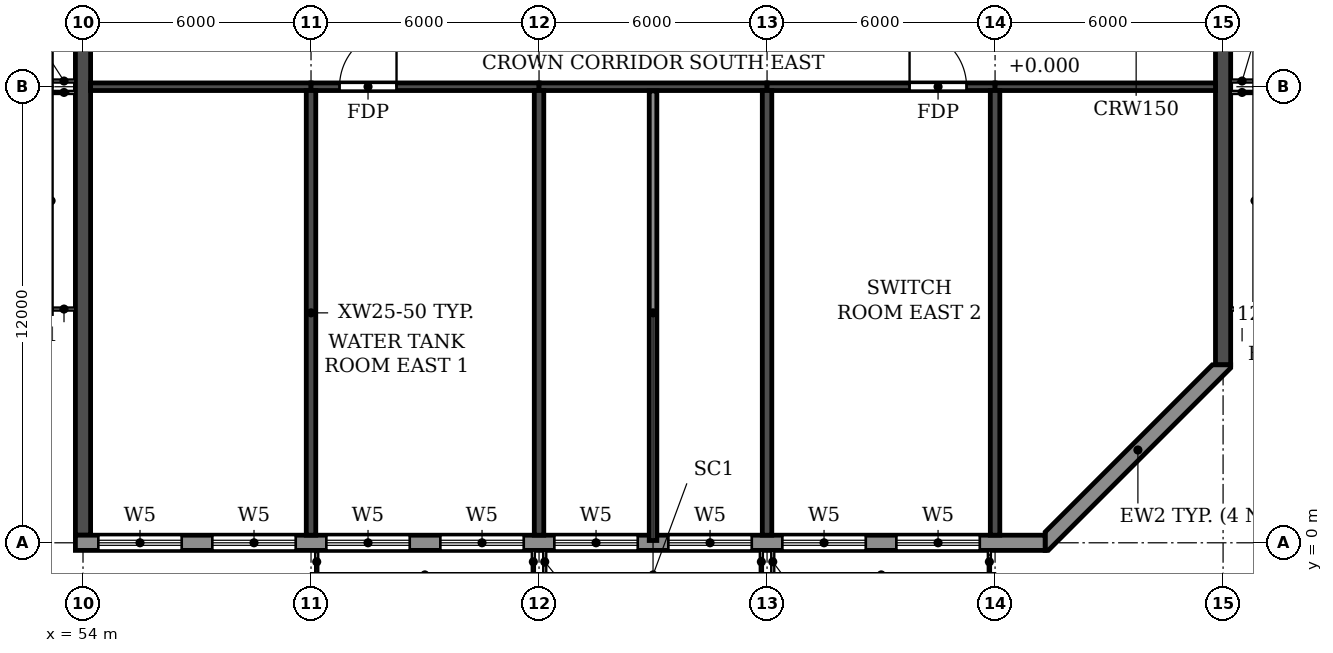
"""IFC4 building model, lengths in metres.
Left out: names, types, materials, properties, quantities, classifications, styles, units other than length and angle.
Written with IfcOpenShell. Run it as: python <this file> out.ifc"""

import sys

from ifc_helpers import new_model, si_unit, direction, frame, frame_2d, origin, place, context, subcontext, project, spatial, polyline, rectangle, outline, extrude, element, fill, save


model = new_model("IFC4")
c1 = context("Model", 3, precision=1e-05, world=origin(), true_north=direction((0.0, 1.0)))
c2 = subcontext(c1, "Body", "Model", "MODEL_VIEW")
j1 = project(units=[si_unit("LENGTHUNIT", "METRE"), si_unit("PLANEANGLEUNIT", "RADIAN")], contexts=[c1])
p1 = place(None, origin())
s1 = spatial("IfcSite", under=j1, at=p1, CompositionType="ELEMENT")
p2 = place(p1, origin())
s2 = spatial("IfcBuilding", under=s1, at=p2, CompositionType="ELEMENT")
p3 = place(p2, frame((0.0, 0.0, 279.0)))
s3 = spatial("IfcBuildingStorey", under=s2, at=p3, CompositionType="ELEMENT", Elevation=279.0)
for number, where, z_axis, x_axis in (
    (1, (60.0, 0.2, 0.0), (0.0, 0.0, 1.0), (0.0, 1.0, 0.0)),
    (2, (66.0, 0.2, 0.0), (0.0, 0.0, 1.0), (0.0, 1.0, 0.0)),
    (3, (72.0, 0.2, 0.0), (0.0, 0.0, 1.0), (0.0, 1.0, 0.0)),
    (4, (78.0, 0.2, 0.0), (0.0, 0.0, 1.0), (0.0, 1.0, 0.0)),
):
    element("IfcWall", number, at=place(p3, frame(where, z_axis=z_axis, x_axis=x_axis)), inside=s3, PredefinedType="SHEAR", context=c2, shape_type="SweptSolid", body=[
        extrude(rectangle(XDim=11.7, YDim=0.25, at=frame_2d((5.85, 0.0))), origin(), (0.0, 0.0, 1.0), 3.05),
    ])
p4 = place(p3, frame((54.0, 0.2, 0.0), z_axis=(0.0, 0.0, 1.0), x_axis=(0.0, 1.0, 0.0)))
e5 = element("IfcWall", 5, at=p4, inside=s3, PredefinedType="SHEAR", context=c2, shape_type="SweptSolid", body=[
    extrude(rectangle(XDim=40.8, YDim=0.4, at=frame_2d((20.4, 0.0))), origin(), (0.0, 0.0, 1.0), 3.05),
])
p5 = place(p3, frame((84.0, 4.683, 0.0), z_axis=(0.0, 0.0, 1.0), x_axis=(0.0, 1.0, 0.0)))
e6 = element("IfcWall", 6, at=p5, inside=s3, PredefinedType="SHEAR", context=c2, shape_type="SweptSolid", body=[
    extrude(rectangle(XDim=31.834, YDim=0.4, at=frame_2d((15.917, 0.0))), origin(), (0.0, 0.0, 1.0), 3.05),
])
p6 = place(p3, frame((54.2, 12.0, 0.0), z_axis=(0.0, 0.0, 1.0), x_axis=(1.0, 0.0, 0.0)))
e7 = element("IfcWall", 7, at=p6, inside=s3, PredefinedType="SHEAR", context=c2, shape_type="SweptSolid", body=[
    extrude(rectangle(XDim=5.8, YDim=0.2, at=frame_2d((2.9, 0.0))), origin(), (0.0, 0.0, 1.0), 2.45),
])
p7 = place(p3, frame((60.0, 12.0, 0.0), z_axis=(0.0, 0.0, 1.0), x_axis=(1.0, 0.0, 0.0)))
e8 = element("IfcWall", 8, at=p7, inside=s3, PredefinedType="SHEAR", context=c2, shape_type="SweptSolid", body=[
    extrude(rectangle(XDim=6.0, YDim=0.2, at=frame_2d((3.0, 0.0))), origin(), (0.0, 0.0, 1.0), 2.45),
])
p8 = place(p7, frame((0.75, 0.0, 0.0)))
e9 = element("IfcOpeningElement", 9, at=p8, cuts=e8, PredefinedType="OPENING", context=c2, shape_type="SweptSolid", body=[
    extrude(rectangle(XDim=1.5, YDim=2.1, at=frame_2d((0.75, 1.05))), frame((0.0, 0.11, 0.0), z_axis=(0.0, -1.0, 0.0), x_axis=(1.0, 0.0, 0.0)), (0.0, 0.0, 1.0), 0.22),
])
p9 = place(p3, frame((66.0, 12.0, 0.0), z_axis=(0.0, 0.0, 1.0), x_axis=(1.0, 0.0, 0.0)))
e10 = element("IfcWall", 10, at=p9, inside=s3, PredefinedType="SHEAR", context=c2, shape_type="SweptSolid", body=[
    extrude(rectangle(XDim=6.0, YDim=0.2, at=frame_2d((3.0, 0.0))), origin(), (0.0, 0.0, 1.0), 2.45),
])
p10 = place(p3, frame((72.0, 12.0, 0.0), z_axis=(0.0, 0.0, 1.0), x_axis=(1.0, 0.0, 0.0)))
e11 = element("IfcWall", 11, at=p10, inside=s3, PredefinedType="SHEAR", context=c2, shape_type="SweptSolid", body=[
    extrude(rectangle(XDim=6.0, YDim=0.2, at=frame_2d((3.0, 0.0))), origin(), (0.0, 0.0, 1.0), 2.45),
])
p11 = place(p10, frame((3.75, 0.0, 0.0)))
e12 = element("IfcOpeningElement", 12, at=p11, cuts=e11, PredefinedType="OPENING", context=c2, shape_type="SweptSolid", body=[
    extrude(rectangle(XDim=1.5, YDim=2.1, at=frame_2d((0.75, 1.05))), frame((0.0, 0.11, 0.0), z_axis=(0.0, -1.0, 0.0), x_axis=(1.0, 0.0, 0.0)), (0.0, 0.0, 1.0), 0.22),
])
p12 = place(p3, frame((78.0, 12.0, 0.0), z_axis=(0.0, 0.0, 1.0), x_axis=(1.0, 0.0, 0.0)))
e13 = element("IfcWall", 13, at=p12, inside=s3, PredefinedType="SHEAR", context=c2, shape_type="SweptSolid", body=[
    extrude(rectangle(XDim=5.8, YDim=0.2, at=frame_2d((2.9, 0.0))), origin(), (0.0, 0.0, 1.0), 2.45),
])
p13 = place(p3, frame((53.8, 0.0, 0.0), z_axis=(0.0, 0.0, 1.0), x_axis=(1.0, 0.0, 0.0)))
e14 = element("IfcWall", 14, at=p13, inside=s3, PredefinedType="STANDARD", context=c2, shape_type="SweptSolid", body=[
    extrude(rectangle(XDim=25.517, YDim=0.4, at=frame_2d((12.759, 0.0))), origin(), (0.0, 0.0, 1.0), 3.05),
])
p14 = place(p13, frame((0.6, 0.0, 0.6)))
e15 = element("IfcOpeningElement", 15, at=p14, cuts=e14, PredefinedType="OPENING", context=c2, shape_type="SweptSolid", body=[
    extrude(rectangle(XDim=2.2, YDim=2.4, at=frame_2d((1.1, 1.2))), frame((0.0, 0.21, 0.0), z_axis=(0.0, -1.0, 0.0), x_axis=(1.0, 0.0, 0.0)), (0.0, 0.0, 1.0), 0.42),
])
p15 = place(p13, frame((3.6, 0.0, 0.6)))
e16 = element("IfcOpeningElement", 16, at=p15, cuts=e14, PredefinedType="OPENING", context=c2, shape_type="SweptSolid", body=[
    extrude(rectangle(XDim=2.2, YDim=2.4, at=frame_2d((1.1, 1.2))), frame((0.0, 0.21, 0.0), z_axis=(0.0, -1.0, 0.0), x_axis=(1.0, 0.0, 0.0)), (0.0, 0.0, 1.0), 0.42),
])
p16 = place(p13, frame((6.6, 0.0, 0.6)))
e17 = element("IfcOpeningElement", 17, at=p16, cuts=e14, PredefinedType="OPENING", context=c2, shape_type="SweptSolid", body=[
    extrude(rectangle(XDim=2.2, YDim=2.4, at=frame_2d((1.1, 1.2))), frame((0.0, 0.21, 0.0), z_axis=(0.0, -1.0, 0.0), x_axis=(1.0, 0.0, 0.0)), (0.0, 0.0, 1.0), 0.42),
])
p17 = place(p13, frame((9.6, 0.0, 0.6)))
e18 = element("IfcOpeningElement", 18, at=p17, cuts=e14, PredefinedType="OPENING", context=c2, shape_type="SweptSolid", body=[
    extrude(rectangle(XDim=2.2, YDim=2.4, at=frame_2d((1.1, 1.2))), frame((0.0, 0.21, 0.0), z_axis=(0.0, -1.0, 0.0), x_axis=(1.0, 0.0, 0.0)), (0.0, 0.0, 1.0), 0.42),
])
p18 = place(p13, frame((12.6, 0.0, 0.6)))
e19 = element("IfcOpeningElement", 19, at=p18, cuts=e14, PredefinedType="OPENING", context=c2, shape_type="SweptSolid", body=[
    extrude(rectangle(XDim=2.2, YDim=2.4, at=frame_2d((1.1, 1.2))), frame((0.0, 0.21, 0.0), z_axis=(0.0, -1.0, 0.0), x_axis=(1.0, 0.0, 0.0)), (0.0, 0.0, 1.0), 0.42),
])
p19 = place(p13, frame((15.6, 0.0, 0.6)))
e20 = element("IfcOpeningElement", 20, at=p19, cuts=e14, PredefinedType="OPENING", context=c2, shape_type="SweptSolid", body=[
    extrude(rectangle(XDim=2.2, YDim=2.4, at=frame_2d((1.1, 1.2))), frame((0.0, 0.21, 0.0), z_axis=(0.0, -1.0, 0.0), x_axis=(1.0, 0.0, 0.0)), (0.0, 0.0, 1.0), 0.42),
])
p20 = place(p13, frame((18.6, 0.0, 0.6)))
e21 = element("IfcOpeningElement", 21, at=p20, cuts=e14, PredefinedType="OPENING", context=c2, shape_type="SweptSolid", body=[
    extrude(rectangle(XDim=2.2, YDim=2.4, at=frame_2d((1.1, 1.2))), frame((0.0, 0.21, 0.0), z_axis=(0.0, -1.0, 0.0), x_axis=(1.0, 0.0, 0.0)), (0.0, 0.0, 1.0), 0.42),
])
p21 = place(p13, frame((21.6, 0.0, 0.6)))
e22 = element("IfcOpeningElement", 22, at=p21, cuts=e14, PredefinedType="OPENING", context=c2, shape_type="SweptSolid", body=[
    extrude(rectangle(XDim=2.2, YDim=2.4, at=frame_2d((1.1, 1.2))), frame((0.0, 0.21, 0.0), z_axis=(0.0, -1.0, 0.0), x_axis=(1.0, 0.0, 0.0)), (0.0, 0.0, 1.0), 0.42),
])
p22 = place(p3, origin())
e23 = element("IfcWall", 23, at=p22, inside=s3, PredefinedType="STANDARD", context=c2, shape_type="SweptSolid", body=[
    extrude(outline(polyline([(79.317, -0.2), (79.4, -0.2), (84.2, 4.6), (84.2, 4.683), (83.717, 4.683), (79.317, 0.283), (79.317, -0.2)])), origin(), (0.0, 0.0, 1.0), 3.05),
])
p23 = place(p3, frame((69.0, 0.06, 0.0), z_axis=(0.0, 0.0, 1.0), x_axis=(0.0, 1.0, 0.0)))
e24 = element("IfcWall", 24, at=p23, inside=s3, PredefinedType="PARTITIONING", context=c2, shape_type="SweptSolid", body=[
    extrude(rectangle(XDim=11.83, YDim=0.2, at=frame_2d((5.915, 0.0))), origin(), (0.0, 0.0, 1.0), 3.05),
])
p24 = place(p14, origin())
e25 = element("IfcWindow", 25, at=p24, inside=s3, PartitioningType="TRIPLE_PANEL_HORIZONTAL", PredefinedType="WINDOW", context=c2, shape_type="SweptSolid", body=[
    extrude(rectangle(XDim=2.2, YDim=2.4, at=frame_2d((1.1, 1.2))), frame((0.0, 0.03, 0.0), z_axis=(0.0, -1.0, 0.0), x_axis=(1.0, 0.0, 0.0)), (0.0, 0.0, 1.0), 0.06),
])
fill(e15, e25)
p25 = place(p15, origin())
e26 = element("IfcWindow", 26, at=p25, inside=s3, PartitioningType="TRIPLE_PANEL_HORIZONTAL", PredefinedType="WINDOW", context=c2, shape_type="SweptSolid", body=[
    extrude(rectangle(XDim=2.2, YDim=2.4, at=frame_2d((1.1, 1.2))), frame((0.0, 0.03, 0.0), z_axis=(0.0, -1.0, 0.0), x_axis=(1.0, 0.0, 0.0)), (0.0, 0.0, 1.0), 0.06),
])
fill(e16, e26)
p26 = place(p16, origin())
e27 = element("IfcWindow", 27, at=p26, inside=s3, PartitioningType="TRIPLE_PANEL_HORIZONTAL", PredefinedType="WINDOW", context=c2, shape_type="SweptSolid", body=[
    extrude(rectangle(XDim=2.2, YDim=2.4, at=frame_2d((1.1, 1.2))), frame((0.0, 0.03, 0.0), z_axis=(0.0, -1.0, 0.0), x_axis=(1.0, 0.0, 0.0)), (0.0, 0.0, 1.0), 0.06),
])
fill(e17, e27)
p27 = place(p17, origin())
e28 = element("IfcWindow", 28, at=p27, inside=s3, PartitioningType="TRIPLE_PANEL_HORIZONTAL", PredefinedType="WINDOW", context=c2, shape_type="SweptSolid", body=[
    extrude(rectangle(XDim=2.2, YDim=2.4, at=frame_2d((1.1, 1.2))), frame((0.0, 0.03, 0.0), z_axis=(0.0, -1.0, 0.0), x_axis=(1.0, 0.0, 0.0)), (0.0, 0.0, 1.0), 0.06),
])
fill(e18, e28)
p28 = place(p18, origin())
e29 = element("IfcWindow", 29, at=p28, inside=s3, PartitioningType="TRIPLE_PANEL_HORIZONTAL", PredefinedType="WINDOW", context=c2, shape_type="SweptSolid", body=[
    extrude(rectangle(XDim=2.2, YDim=2.4, at=frame_2d((1.1, 1.2))), frame((0.0, 0.03, 0.0), z_axis=(0.0, -1.0, 0.0), x_axis=(1.0, 0.0, 0.0)), (0.0, 0.0, 1.0), 0.06),
])
fill(e19, e29)
p29 = place(p19, origin())
e30 = element("IfcWindow", 30, at=p29, inside=s3, PartitioningType="TRIPLE_PANEL_HORIZONTAL", PredefinedType="WINDOW", context=c2, shape_type="SweptSolid", body=[
    extrude(rectangle(XDim=2.2, YDim=2.4, at=frame_2d((1.1, 1.2))), frame((0.0, 0.03, 0.0), z_axis=(0.0, -1.0, 0.0), x_axis=(1.0, 0.0, 0.0)), (0.0, 0.0, 1.0), 0.06),
])
fill(e20, e30)
p30 = place(p20, origin())
e31 = element("IfcWindow", 31, at=p30, inside=s3, PartitioningType="TRIPLE_PANEL_HORIZONTAL", PredefinedType="WINDOW", context=c2, shape_type="SweptSolid", body=[
    extrude(rectangle(XDim=2.2, YDim=2.4, at=frame_2d((1.1, 1.2))), frame((0.0, 0.03, 0.0), z_axis=(0.0, -1.0, 0.0), x_axis=(1.0, 0.0, 0.0)), (0.0, 0.0, 1.0), 0.06),
])
fill(e21, e31)
p31 = place(p21, origin())
e32 = element("IfcWindow", 32, at=p31, inside=s3, PartitioningType="TRIPLE_PANEL_HORIZONTAL", PredefinedType="WINDOW", context=c2, shape_type="SweptSolid", body=[
    extrude(rectangle(XDim=2.2, YDim=2.4, at=frame_2d((1.1, 1.2))), frame((0.0, 0.03, 0.0), z_axis=(0.0, -1.0, 0.0), x_axis=(1.0, 0.0, 0.0)), (0.0, 0.0, 1.0), 0.06),
])
fill(e22, e32)
p32 = place(p8, origin())
e33 = element("IfcDoor", 33, at=p32, inside=s3, OperationType="DOUBLE_DOOR_SINGLE_SWING", PredefinedType="DOOR", context=c2, shape_type="SweptSolid", body=[
    extrude(rectangle(XDim=1.5, YDim=2.1, at=frame_2d((0.75, 1.05))), frame((0.0, 0.025, 0.0), z_axis=(0.0, -1.0, 0.0), x_axis=(1.0, 0.0, 0.0)), (0.0, 0.0, 1.0), 0.05),
])
fill(e9, e33)
p33 = place(p11, origin())
e34 = element("IfcDoor", 34, at=p33, inside=s3, OperationType="DOUBLE_DOOR_SINGLE_SWING", PredefinedType="DOOR", context=c2, shape_type="SweptSolid", body=[
    extrude(rectangle(XDim=1.5, YDim=2.1, at=frame_2d((0.75, 1.05))), frame((0.0, 0.025, 0.0), z_axis=(0.0, -1.0, 0.0), x_axis=(1.0, 0.0, 0.0)), (0.0, 0.0, 1.0), 0.05),
])
fill(e12, e34)
save(model, sys.argv[1])
